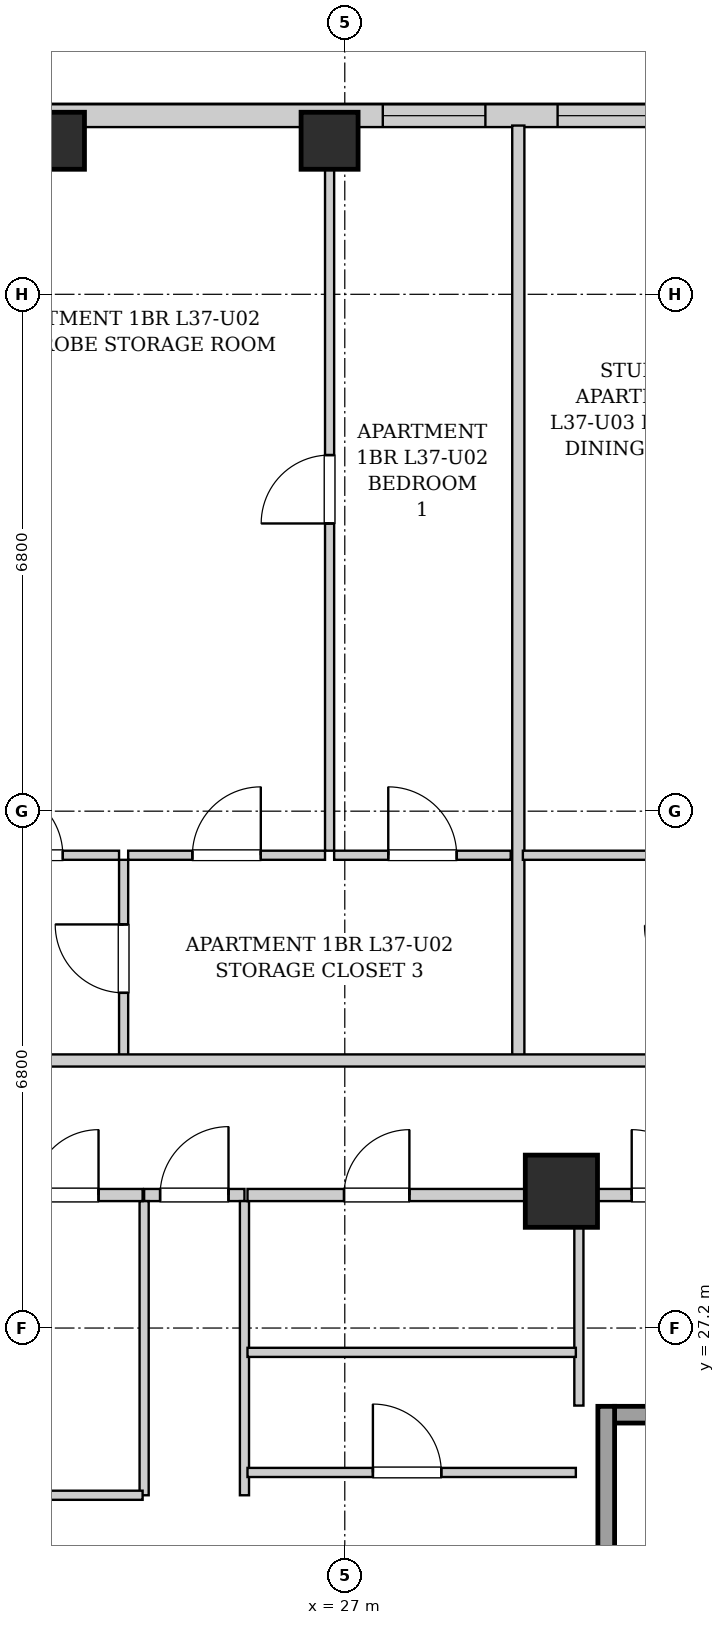
"""IFC4 building model, lengths in metres.
Left out: names, types, materials, properties, quantities, classifications, styles, units other than length and angle.
Written with IfcOpenShell. Run it as: python <this file> out.ifc"""

import sys

from ifc_helpers import new_model, si_unit, direction, frame, frame_2d, origin, origin_2d, place, context, subcontext, project, spatial, rectangle, extrude, element, fill, save


model = new_model("IFC4")
c1 = context("Model", 3, precision=1e-05, world=origin(), true_north=direction((0.0, 1.0)))
c2 = subcontext(c1, "Body", "Model", "MODEL_VIEW")
j1 = project(units=[si_unit("LENGTHUNIT", "METRE"), si_unit("PLANEANGLEUNIT", "RADIAN")], contexts=[c1])
p1 = place(None, origin())
s1 = spatial("IfcSite", under=j1, at=p1, CompositionType="ELEMENT")
p2 = place(p1, origin())
s2 = spatial("IfcBuilding", under=s1, at=p2, CompositionType="ELEMENT")
p3 = place(p2, frame((0.0, 0.0, 130.9)))
s3 = spatial("IfcBuildingStorey", under=s2, at=p3, CompositionType="ELEMENT", Elevation=130.9)
for number, where, z_axis, x_axis in (
    (1, (23.2, 42.82, 0.0), (0.0, 0.0, 1.0), (1.0, 0.0, 0.0)),
    (2, (26.8, 42.82, 0.0), (0.0, 0.0, 1.0), (1.0, 0.0, 0.0)),
):
    element("IfcColumn", number, at=place(p3, frame(where, z_axis=z_axis, x_axis=x_axis)), inside=s3, PredefinedType="COLUMN", context=c2, shape_type="SweptSolid", body=[
        extrude(rectangle(XDim=0.75, YDim=0.75, at=origin_2d()), origin(), (0.0, 0.0, 1.0), 3.25),
    ])
p4 = place(p3, frame((29.85, 29.0, 0.0), z_axis=(0.0, 0.0, 1.0), x_axis=(1.0, 0.0, 0.0)))
e3 = element("IfcColumn", 3, at=p4, inside=s3, PredefinedType="COLUMN", context=c2, shape_type="SweptSolid", body=[
    extrude(rectangle(XDim=0.95, YDim=0.95, at=origin_2d()), origin(), (0.0, 0.0, 1.0), 3.25),
])
p5 = place(p3, frame((10.0, 43.15, 0.0), z_axis=(0.0, 0.0, 1.0), x_axis=(1.0, 0.0, 0.0)))
e4 = element("IfcWall", 4, at=p5, inside=s3, PredefinedType="SOLIDWALL", context=c2, shape_type="SweptSolid", body=[
    extrude(rectangle(XDim=21.9, YDim=0.3, at=frame_2d((10.95, 0.0))), origin(), (0.0, 0.0, 1.0), 2.99),
])
p6 = place(p5, frame((5.475, 0.0, 0.55)))
e5 = element("IfcOpeningElement", 5, at=p6, cuts=e4, PredefinedType="OPENING", context=c2, shape_type="SweptSolid", body=[
    extrude(rectangle(XDim=1.35, YDim=1.2, at=frame_2d((0.675, 0.6))), frame((0.0, 0.16, 0.0), z_axis=(0.0, -1.0, 0.0), x_axis=(1.0, 0.0, 0.0)), (0.0, 0.0, 1.0), 0.32),
])
p7 = place(p5, frame((9.15, 0.0, 0.55)))
e6 = element("IfcOpeningElement", 6, at=p7, cuts=e4, PredefinedType="OPENING", context=c2, shape_type="SweptSolid", body=[
    extrude(rectangle(XDim=1.35, YDim=1.2, at=frame_2d((0.675, 0.6))), frame((0.0, 0.16, 0.0), z_axis=(0.0, -1.0, 0.0), x_axis=(1.0, 0.0, 0.0)), (0.0, 0.0, 1.0), 0.32),
])
p8 = place(p5, frame((17.5, 0.0, 0.55)))
e7 = element("IfcOpeningElement", 7, at=p8, cuts=e4, PredefinedType="OPENING", context=c2, shape_type="SweptSolid", body=[
    extrude(rectangle(XDim=1.35, YDim=1.2, at=frame_2d((0.675, 0.6))), frame((0.0, 0.16, 0.0), z_axis=(0.0, -1.0, 0.0), x_axis=(1.0, 0.0, 0.0)), (0.0, 0.0, 1.0), 0.32),
])
p9 = place(p5, frame((19.8, 0.0, 0.55)))
e8 = element("IfcOpeningElement", 8, at=p9, cuts=e4, PredefinedType="OPENING", context=c2, shape_type="SweptSolid", body=[
    extrude(rectangle(XDim=1.35, YDim=1.2, at=frame_2d((0.675, 0.6))), frame((0.0, 0.16, 0.0), z_axis=(0.0, -1.0, 0.0), x_axis=(1.0, 0.0, 0.0)), (0.0, 0.0, 1.0), 0.32),
])
p10 = place(p3, frame((30.55, 26.06, 0.0), z_axis=(0.0, 0.0, 1.0), x_axis=(1.0, 0.0, 0.0)))
e9 = element("IfcWall", 9, at=p10, inside=s3, PredefinedType="SHEAR", context=c2, shape_type="SweptSolid", body=[
    extrude(rectangle(XDim=1.9, YDim=0.22, at=frame_2d((0.95, 0.0))), origin(), (0.0, 0.0, 1.0), 2.99),
])
p11 = place(p3, frame((30.44, 24.1, 0.0), z_axis=(0.0, 0.0, 1.0), x_axis=(0.0, 1.0, 0.0)))
e10 = element("IfcWall", 10, at=p11, inside=s3, PredefinedType="SHEAR", context=c2, shape_type="SweptSolid", body=[
    extrude(rectangle(XDim=2.07, YDim=0.22, at=frame_2d((1.035, 0.0))), origin(), (0.0, 0.0, 1.0), 2.99),
])
p12 = place(p3, frame((24.36, 28.95, 0.0), z_axis=(0.0, 0.0, 1.0), x_axis=(1.0, 0.0, 0.0)))
e11 = element("IfcWall", 11, at=p12, inside=s3, PredefinedType="PARTITIONING", context=c2, shape_type="SweptSolid", body=[
    extrude(rectangle(XDim=1.32, YDim=0.16, at=frame_2d((0.66, 0.0))), origin(), (0.0, 0.0, 1.0), 2.426),
])
p13 = place(p12, frame((0.21, 0.0, 0.0)))
e12 = element("IfcOpeningElement", 12, at=p13, cuts=e11, PredefinedType="OPENING", context=c2, shape_type="SweptSolid", body=[
    extrude(rectangle(XDim=0.9, YDim=2.05, at=frame_2d((0.45, 1.025))), frame((0.0, 0.09, 0.0), z_axis=(0.0, -1.0, 0.0), x_axis=(1.0, 0.0, 0.0)), (0.0, 0.0, 1.0), 0.18),
])
for number, where, z_axis, x_axis in (
    (13, (24.36, 25.0, 0.0), (0.0, 0.0, 1.0), (0.0, 1.0, 0.0)),
    (14, (25.68, 25.0, 0.0), (0.0, 0.0, 1.0), (0.0, 1.0, 0.0)),
):
    element("IfcWall", number, at=place(p3, frame(where, z_axis=z_axis, x_axis=x_axis)), inside=s3, PredefinedType="PARTITIONING", context=c2, shape_type="SweptSolid", body=[
        extrude(rectangle(XDim=3.87, YDim=0.12, at=frame_2d((1.935, 0.0))), origin(), (0.0, 0.0, 1.0), 2.99),
    ])
p14 = place(p3, frame((30.08, 26.18, 0.0), z_axis=(0.0, 0.0, 1.0), x_axis=(0.0, 1.0, 0.0)))
e15 = element("IfcWall", 15, at=p14, inside=s3, PredefinedType="PARTITIONING", context=c2, shape_type="SweptSolid", body=[
    extrude(rectangle(XDim=2.68, YDim=0.12, at=frame_2d((1.34, 0.0))), origin(), (0.0, 0.0, 1.0), 2.99),
])
p15 = place(p3, frame((30.08, 28.95, 0.0), z_axis=(0.0, 0.0, 1.0), x_axis=(1.0, 0.0, 0.0)))
e16 = element("IfcWall", 16, at=p15, inside=s3, PredefinedType="PARTITIONING", context=c2, shape_type="SweptSolid", body=[
    extrude(rectangle(XDim=2.96, YDim=0.16, at=frame_2d((1.48, 0.0))), origin(), (0.0, 0.0, 1.0), 2.99),
])
p16 = place(p15, frame((0.695, 0.0, 0.0)))
e17 = element("IfcOpeningElement", 17, at=p16, cuts=e16, PredefinedType="OPENING", context=c2, shape_type="SweptSolid", body=[
    extrude(rectangle(XDim=0.86, YDim=2.05, at=frame_2d((0.43, 1.025))), frame((0.0, 0.09, 0.0), z_axis=(0.0, -1.0, 0.0), x_axis=(1.0, 0.0, 0.0)), (0.0, 0.0, 1.0), 0.18),
])
p17 = place(p3, frame((22.3, 25.0, 0.0), z_axis=(0.0, 0.0, 1.0), x_axis=(1.0, 0.0, 0.0)))
e18 = element("IfcWall", 18, at=p17, inside=s3, PredefinedType="PARTITIONING", context=c2, shape_type="SweptSolid", body=[
    extrude(rectangle(XDim=2.04, YDim=0.12, at=frame_2d((1.02, 0.0))), origin(), (0.0, 0.0, 1.0), 2.99),
])
p18 = place(p3, frame((22.28, 28.95, 0.0), z_axis=(0.0, 0.0, 1.0), x_axis=(1.0, 0.0, 0.0)))
e19 = element("IfcWall", 19, at=p18, inside=s3, PredefinedType="PARTITIONING", context=c2, shape_type="SweptSolid", body=[
    extrude(rectangle(XDim=2.06, YDim=0.16, at=frame_2d((1.03, 0.0))), origin(), (0.0, 0.0, 1.0), 2.426),
])
p19 = place(p18, frame((0.62, 0.0, 0.0)))
e20 = element("IfcOpeningElement", 20, at=p19, cuts=e19, PredefinedType="OPENING", context=c2, shape_type="SweptSolid", body=[
    extrude(rectangle(XDim=0.86, YDim=2.05, at=frame_2d((0.43, 1.025))), frame((0.0, 0.09, 0.0), z_axis=(0.0, -1.0, 0.0), x_axis=(1.0, 0.0, 0.0)), (0.0, 0.0, 1.0), 0.18),
])
p20 = place(p3, frame((25.72, 26.88, 0.0), z_axis=(0.0, 0.0, 1.0), x_axis=(1.0, 0.0, 0.0)))
e21 = element("IfcWall", 21, at=p20, inside=s3, PredefinedType="PARTITIONING", context=c2, shape_type="SweptSolid", body=[
    extrude(rectangle(XDim=4.32, YDim=0.12, at=frame_2d((2.16, 0.0))), origin(), (0.0, 0.0, 1.0), 2.99),
])
p21 = place(p3, frame((25.72, 25.3, 0.0), z_axis=(0.0, 0.0, 1.0), x_axis=(1.0, 0.0, 0.0)))
e22 = element("IfcWall", 22, at=p21, inside=s3, PredefinedType="PARTITIONING", context=c2, shape_type="SweptSolid", body=[
    extrude(rectangle(XDim=4.32, YDim=0.12, at=frame_2d((2.16, 0.0))), origin(), (0.0, 0.0, 1.0), 2.99),
])
p22 = place(p21, frame((1.65, 0.0, 0.0)))
e23 = element("IfcOpeningElement", 23, at=p22, cuts=e22, PredefinedType="OPENING", context=c2, shape_type="SweptSolid", body=[
    extrude(rectangle(XDim=0.9, YDim=2.05, at=frame_2d((0.45, 1.025))), frame((0.0, 0.07, 0.0), z_axis=(0.0, -1.0, 0.0), x_axis=(1.0, 0.0, 0.0)), (0.0, 0.0, 1.0), 0.14),
])
p23 = place(p3, frame((25.72, 28.95, 0.0), z_axis=(0.0, 0.0, 1.0), x_axis=(1.0, 0.0, 0.0)))
e24 = element("IfcWall", 24, at=p23, inside=s3, PredefinedType="PARTITIONING", context=c2, shape_type="SweptSolid", body=[
    extrude(rectangle(XDim=4.32, YDim=0.16, at=frame_2d((2.16, 0.0))), origin(), (0.0, 0.0, 1.0), 2.426),
])
p24 = place(p23, frame((1.27, 0.0, 0.0)))
e25 = element("IfcOpeningElement", 25, at=p24, cuts=e24, PredefinedType="OPENING", context=c2, shape_type="SweptSolid", body=[
    extrude(rectangle(XDim=0.86, YDim=2.05, at=frame_2d((0.43, 1.025))), frame((0.0, 0.09, 0.0), z_axis=(0.0, -1.0, 0.0), x_axis=(1.0, 0.0, 0.0)), (0.0, 0.0, 1.0), 0.18),
])
p25 = place(p3, frame((24.09, 30.76, 0.0), z_axis=(0.0, 0.0, 1.0), x_axis=(0.0, 1.0, 0.0)))
e26 = element("IfcWall", 26, at=p25, inside=s3, PredefinedType="PARTITIONING", context=c2, shape_type="SweptSolid", body=[
    extrude(rectangle(XDim=2.6, YDim=0.12, at=frame_2d((1.3, 0.0))), origin(), (0.0, 0.0, 1.0), 2.99),
])
p26 = place(p25, frame((0.85, 0.0, 0.0)))
e27 = element("IfcOpeningElement", 27, at=p26, cuts=e26, PredefinedType="OPENING", context=c2, shape_type="SweptSolid", body=[
    extrude(rectangle(XDim=0.9, YDim=2.05, at=frame_2d((0.45, 1.025))), frame((0.0, 0.07, 0.0), z_axis=(0.0, -1.0, 0.0), x_axis=(1.0, 0.0, 0.0)), (0.0, 0.0, 1.0), 0.14),
])
p27 = place(p3, frame((21.65, 33.42, 0.0), z_axis=(0.0, 0.0, 1.0), x_axis=(1.0, 0.0, 0.0)))
e28 = element("IfcWall", 28, at=p27, inside=s3, PredefinedType="PARTITIONING", context=c2, shape_type="SweptSolid", body=[
    extrude(rectangle(XDim=2.38, YDim=0.12, at=frame_2d((1.19, 0.0))), origin(), (0.0, 0.0, 1.0), 2.99),
])
p28 = place(p27, frame((0.74, 0.0, 0.0)))
e29 = element("IfcOpeningElement", 29, at=p28, cuts=e28, PredefinedType="OPENING", context=c2, shape_type="SweptSolid", body=[
    extrude(rectangle(XDim=0.9, YDim=2.05, at=frame_2d((0.45, 1.025))), frame((0.0, 0.07, 0.0), z_axis=(0.0, -1.0, 0.0), x_axis=(1.0, 0.0, 0.0)), (0.0, 0.0, 1.0), 0.14),
])
p29 = place(p3, frame((24.15, 33.42, 0.0), z_axis=(0.0, 0.0, 1.0), x_axis=(1.0, 0.0, 0.0)))
e30 = element("IfcWall", 30, at=p29, inside=s3, PredefinedType="PARTITIONING", context=c2, shape_type="SweptSolid", body=[
    extrude(rectangle(XDim=2.59, YDim=0.12, at=frame_2d((1.295, 0.0))), origin(), (0.0, 0.0, 1.0), 2.99),
])
p30 = place(p29, frame((0.845, 0.0, 0.0)))
e31 = element("IfcOpeningElement", 31, at=p30, cuts=e30, PredefinedType="OPENING", context=c2, shape_type="SweptSolid", body=[
    extrude(rectangle(XDim=0.9, YDim=2.05, at=frame_2d((0.45, 1.025))), frame((0.0, 0.07, 0.0), z_axis=(0.0, -1.0, 0.0), x_axis=(1.0, 0.0, 0.0)), (0.0, 0.0, 1.0), 0.14),
])
p31 = place(p3, frame((26.86, 33.42, 0.0), z_axis=(0.0, 0.0, 1.0), x_axis=(1.0, 0.0, 0.0)))
e32 = element("IfcWall", 32, at=p31, inside=s3, PredefinedType="PARTITIONING", context=c2, shape_type="SweptSolid", body=[
    extrude(rectangle(XDim=2.323, YDim=0.12, at=frame_2d((1.162, 0.0))), origin(), (0.0, 0.0, 1.0), 2.99),
])
p32 = place(p31, frame((0.712, 0.0, 0.0)))
e33 = element("IfcOpeningElement", 33, at=p32, cuts=e32, PredefinedType="OPENING", context=c2, shape_type="SweptSolid", body=[
    extrude(rectangle(XDim=0.9, YDim=2.05, at=frame_2d((0.45, 1.025))), frame((0.0, 0.07, 0.0), z_axis=(0.0, -1.0, 0.0), x_axis=(1.0, 0.0, 0.0)), (0.0, 0.0, 1.0), 0.14),
])
p33 = place(p3, frame((26.8, 33.48, 0.0), z_axis=(0.0, 0.0, 1.0), x_axis=(0.0, 1.0, 0.0)))
e34 = element("IfcWall", 34, at=p33, inside=s3, PredefinedType="PARTITIONING", context=c2, shape_type="SweptSolid", body=[
    extrude(rectangle(XDim=9.54, YDim=0.12, at=frame_2d((4.77, 0.0))), origin(), (0.0, 0.0, 1.0), 2.99),
])
p34 = place(p33, frame((4.305, 0.0, 0.0)))
e35 = element("IfcOpeningElement", 35, at=p34, cuts=e34, PredefinedType="OPENING", context=c2, shape_type="SweptSolid", body=[
    extrude(rectangle(XDim=0.9, YDim=2.05, at=frame_2d((0.45, 1.025))), frame((0.0, 0.07, 0.0), z_axis=(0.0, -1.0, 0.0), x_axis=(1.0, 0.0, 0.0)), (0.0, 0.0, 1.0), 0.14),
])
p35 = place(p3, frame((29.283, 30.76, 0.0), z_axis=(0.0, 0.0, 1.0), x_axis=(0.0, 1.0, 0.0)))
e36 = element("IfcWall", 36, at=p35, inside=s3, PredefinedType="PARTITIONING", context=c2, shape_type="SweptSolid", body=[
    extrude(rectangle(XDim=12.26, YDim=0.16, at=frame_2d((6.13, 0.0))), origin(), (0.0, 0.0, 1.0), 2.99),
])
p36 = place(p3, frame((29.343, 33.42, 0.0), z_axis=(0.0, 0.0, 1.0), x_axis=(1.0, 0.0, 0.0)))
e37 = element("IfcWall", 37, at=p36, inside=s3, PredefinedType="PARTITIONING", context=c2, shape_type="SweptSolid", body=[
    extrude(rectangle(XDim=2.4, YDim=0.12, at=frame_2d((1.2, 0.0))), origin(), (0.0, 0.0, 1.0), 2.99),
])
p37 = place(p3, frame((10.05, 30.72, 0.0), z_axis=(0.0, 0.0, 1.0), x_axis=(1.0, 0.0, 0.0)))
e38 = element("IfcWall", 38, at=p37, inside=s3, PredefinedType="PARTITIONING", context=c2, shape_type="SweptSolid", body=[
    extrude(rectangle(XDim=27.7, YDim=0.16, at=frame_2d((13.85, 0.0))), origin(), (0.0, 0.0, 1.0), 2.99),
])
p38 = place(p37, frame((4.295, 0.0, 0.0)))
e39 = element("IfcOpeningElement", 39, at=p38, cuts=e38, PredefinedType="OPENING", context=c2, shape_type="SweptSolid", body=[
    extrude(rectangle(XDim=0.95, YDim=2.1, at=frame_2d((0.475, 1.05))), frame((0.0, 0.09, 0.0), z_axis=(0.0, -1.0, 0.0), x_axis=(1.0, 0.0, 0.0)), (0.0, 0.0, 1.0), 0.18),
])
p39 = place(p37, frame((23.785, 0.0, 0.0)))
e40 = element("IfcOpeningElement", 40, at=p39, cuts=e38, PredefinedType="OPENING", context=c2, shape_type="SweptSolid", body=[
    extrude(rectangle(XDim=0.95, YDim=2.1, at=frame_2d((0.475, 1.05))), frame((0.0, 0.09, 0.0), z_axis=(0.0, -1.0, 0.0), x_axis=(1.0, 0.0, 0.0)), (0.0, 0.0, 1.0), 0.18),
])
p40 = place(p13, origin())
e41 = element("IfcDoor", 41, at=p40, inside=s3, OperationType="SINGLE_SWING_RIGHT", PredefinedType="DOOR", context=c2, shape_type="SweptSolid", body=[
    extrude(rectangle(XDim=0.9, YDim=2.05, at=frame_2d((0.45, 1.025))), frame((0.0, 0.025, 0.0), z_axis=(0.0, -1.0, 0.0), x_axis=(1.0, 0.0, 0.0)), (0.0, 0.0, 1.0), 0.05),
])
fill(e12, e41)
p41 = place(p16, origin())
e42 = element("IfcDoor", 42, at=p41, inside=s3, OperationType="SINGLE_SWING_LEFT", PredefinedType="DOOR", context=c2, shape_type="SweptSolid", body=[
    extrude(rectangle(XDim=0.86, YDim=2.05, at=frame_2d((0.43, 1.025))), frame((0.0, 0.025, 0.0), z_axis=(0.0, -1.0, 0.0), x_axis=(1.0, 0.0, 0.0)), (0.0, 0.0, 1.0), 0.05),
])
fill(e17, e42)
p42 = place(p19, origin())
e43 = element("IfcDoor", 43, at=p42, inside=s3, OperationType="SINGLE_SWING_RIGHT", PredefinedType="DOOR", context=c2, shape_type="SweptSolid", body=[
    extrude(rectangle(XDim=0.86, YDim=2.05, at=frame_2d((0.43, 1.025))), frame((0.0, 0.025, 0.0), z_axis=(0.0, -1.0, 0.0), x_axis=(1.0, 0.0, 0.0)), (0.0, 0.0, 1.0), 0.05),
])
fill(e20, e43)
p43 = place(p22, origin())
e44 = element("IfcDoor", 44, at=p43, inside=s3, OperationType="SINGLE_SWING_LEFT", PredefinedType="DOOR", context=c2, shape_type="SweptSolid", body=[
    extrude(rectangle(XDim=0.9, YDim=2.05, at=frame_2d((0.45, 1.025))), frame((0.0, 0.025, 0.0), z_axis=(0.0, -1.0, 0.0), x_axis=(1.0, 0.0, 0.0)), (0.0, 0.0, 1.0), 0.05),
])
fill(e23, e44)
p44 = place(p24, origin())
e45 = element("IfcDoor", 45, at=p44, inside=s3, OperationType="SINGLE_SWING_RIGHT", PredefinedType="DOOR", context=c2, shape_type="SweptSolid", body=[
    extrude(rectangle(XDim=0.86, YDim=2.05, at=frame_2d((0.43, 1.025))), frame((0.0, 0.025, 0.0), z_axis=(0.0, -1.0, 0.0), x_axis=(1.0, 0.0, 0.0)), (0.0, 0.0, 1.0), 0.05),
])
fill(e25, e45)
p45 = place(p26, origin())
e46 = element("IfcDoor", 46, at=p45, inside=s3, OperationType="SINGLE_SWING_RIGHT", PredefinedType="DOOR", context=c2, shape_type="SweptSolid", body=[
    extrude(rectangle(XDim=0.9, YDim=2.05, at=frame_2d((0.45, 1.025))), frame((0.0, 0.025, 0.0), z_axis=(0.0, -1.0, 0.0), x_axis=(1.0, 0.0, 0.0)), (0.0, 0.0, 1.0), 0.05),
])
fill(e27, e46)
p46 = place(p28, origin())
e47 = element("IfcDoor", 47, at=p46, inside=s3, OperationType="SINGLE_SWING_LEFT", PredefinedType="DOOR", context=c2, shape_type="SweptSolid", body=[
    extrude(rectangle(XDim=0.9, YDim=2.05, at=frame_2d((0.45, 1.025))), frame((0.0, 0.025, 0.0), z_axis=(0.0, -1.0, 0.0), x_axis=(1.0, 0.0, 0.0)), (0.0, 0.0, 1.0), 0.05),
])
fill(e29, e47)
p47 = place(p30, origin())
e48 = element("IfcDoor", 48, at=p47, inside=s3, OperationType="SINGLE_SWING_RIGHT", PredefinedType="DOOR", context=c2, shape_type="SweptSolid", body=[
    extrude(rectangle(XDim=0.9, YDim=2.05, at=frame_2d((0.45, 1.025))), frame((0.0, 0.025, 0.0), z_axis=(0.0, -1.0, 0.0), x_axis=(1.0, 0.0, 0.0)), (0.0, 0.0, 1.0), 0.05),
])
fill(e31, e48)
p48 = place(p32, origin())
e49 = element("IfcDoor", 49, at=p48, inside=s3, OperationType="SINGLE_SWING_LEFT", PredefinedType="DOOR", context=c2, shape_type="SweptSolid", body=[
    extrude(rectangle(XDim=0.9, YDim=2.05, at=frame_2d((0.45, 1.025))), frame((0.0, 0.025, 0.0), z_axis=(0.0, -1.0, 0.0), x_axis=(1.0, 0.0, 0.0)), (0.0, 0.0, 1.0), 0.05),
])
fill(e33, e49)
p49 = place(p34, origin())
e50 = element("IfcDoor", 50, at=p49, inside=s3, OperationType="SINGLE_SWING_LEFT", PredefinedType="DOOR", context=c2, shape_type="SweptSolid", body=[
    extrude(rectangle(XDim=0.9, YDim=2.05, at=frame_2d((0.45, 1.025))), frame((0.0, 0.025, 0.0), z_axis=(0.0, -1.0, 0.0), x_axis=(1.0, 0.0, 0.0)), (0.0, 0.0, 1.0), 0.05),
])
fill(e35, e50)
p50 = place(p8, origin())
e51 = element("IfcWindow", 51, at=p50, inside=s3, PartitioningType="SINGLE_PANEL", PredefinedType="WINDOW", context=c2, shape_type="SweptSolid", body=[
    extrude(rectangle(XDim=1.35, YDim=1.2, at=frame_2d((0.675, 0.6))), frame((0.0, 0.03, 0.0), z_axis=(0.0, -1.0, 0.0), x_axis=(1.0, 0.0, 0.0)), (0.0, 0.0, 1.0), 0.06),
])
fill(e7, e51)
p51 = place(p9, origin())
e52 = element("IfcWindow", 52, at=p51, inside=s3, PartitioningType="SINGLE_PANEL", PredefinedType="WINDOW", context=c2, shape_type="SweptSolid", body=[
    extrude(rectangle(XDim=1.35, YDim=1.2, at=frame_2d((0.675, 0.6))), frame((0.0, 0.03, 0.0), z_axis=(0.0, -1.0, 0.0), x_axis=(1.0, 0.0, 0.0)), (0.0, 0.0, 1.0), 0.06),
])
fill(e8, e52)
save(model, sys.argv[1])
